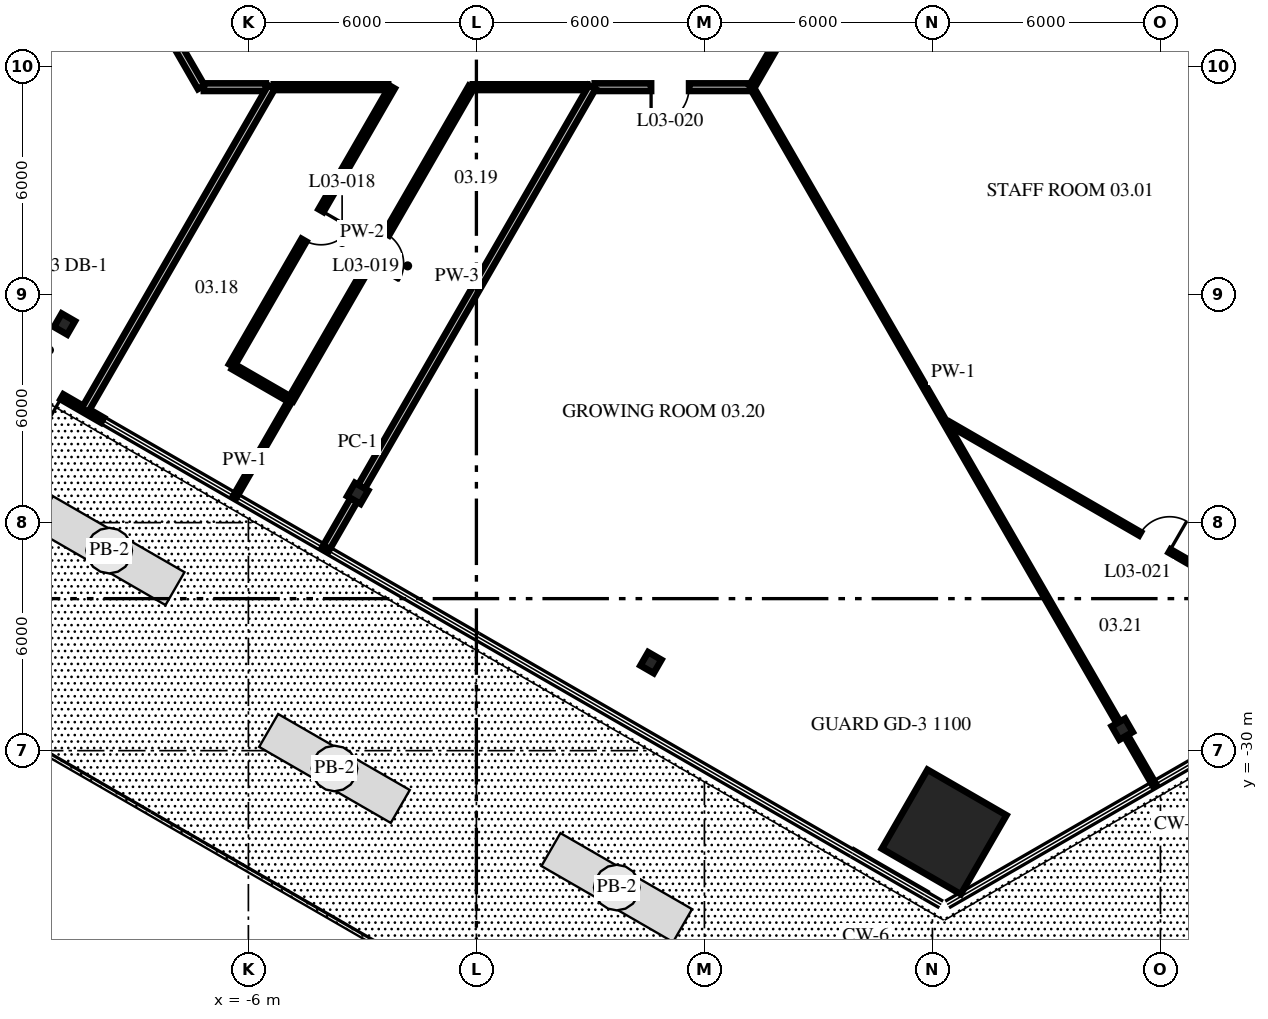
"""IFC4 building model, lengths in metres.
Left out: names, types, materials, properties, quantities, classifications, styles, units other than length and angle.
Written with IfcOpenShell. Run it as: python <this file> out.ifc"""

import sys

from ifc_helpers import new_model, si_unit, direction, frame, frame_2d, origin, origin_2d, place, context, subcontext, project, spatial, rectangle, i_section, extrude, source, transform, mapped, element, fill, save


model = new_model("IFC4")
c1 = context("Model", 3, precision=1e-05, world=origin(), true_north=direction((0.0, 1.0)))
c2 = subcontext(c1, "Body", "Model", "MODEL_VIEW")
j1 = project(units=[si_unit("LENGTHUNIT", "METRE"), si_unit("PLANEANGLEUNIT", "RADIAN")], contexts=[c1])
p1 = place(None, origin())
s1 = spatial("IfcSite", under=j1, at=p1, CompositionType="ELEMENT")
p2 = place(p1, origin())
s2 = spatial("IfcBuilding", under=s1, at=p2, CompositionType="ELEMENT")
p3 = place(p2, frame((0.0, 0.0, 16.0)))
s3 = spatial("IfcBuildingStorey", under=s2, at=p3, CompositionType="ELEMENT", Elevation=16.0)
m1 = source(origin(), c2, "Body", "SweptSolid", [
    extrude(i_section(OverallWidth=0.404, OverallDepth=0.406, WebThickness=0.027, FlangeThickness=0.044, at=origin_2d()), origin(), (0.0, 0.0, 1.0), 4.3),
])
for number, where, z_axis, x_axis in (
    (1, (-10.84, -18.775, 0.0), (0.0, 0.0, 1.0), (0.866, -0.5, 0.0)),
    (2, (-3.124, -23.23, 0.0), (0.0, 0.0, 1.0), (0.866, -0.5, 0.0)),
    (3, (4.593, -27.685, 0.0), (0.0, 0.0, 1.0), (0.866, -0.5, 0.0)),
):
    element("IfcColumn", number, at=place(p3, frame(where, z_axis=z_axis, x_axis=x_axis)), inside=s3, PredefinedType="COLUMN", context=c2, shape_type="MappedRepresentation", body=[
        mapped(m1, transform((0.0, 0.0, 0.0), scale=1.0)),
    ])
m2 = source(origin(), c2, "Body", "SweptSolid", [
    extrude(rectangle(XDim=2.4, YDim=2.4, at=origin_2d()), origin(), (0.0, 0.0, 1.0), 4.3),
])
p4 = place(p3, frame((12.309, -32.14, 0.0), z_axis=(0.0, 0.0, 1.0), x_axis=(0.866025403784, -0.5, 0.0)))
e4 = element("IfcColumn", 4, at=p4, inside=s3, PredefinedType="COLUMN", context=c2, shape_type="MappedRepresentation", body=[
    mapped(m2, transform((0.0, 0.0, 0.0), scale=1.0)),
])
p5 = place(p3, frame((16.994, -29.435, 0.0), z_axis=(0.0, 0.0, 1.0), x_axis=(0.866026276448, 0.4999984885, 0.0)))
e5 = element("IfcColumn", 5, at=p5, inside=s3, PredefinedType="COLUMN", context=c2, shape_type="MappedRepresentation", body=[
    mapped(m1, transform((0.0, 0.0, 0.0), scale=1.0)),
])
m3 = source(origin(), c2, "Body", "SweptSolid", [
    extrude(rectangle(XDim=4.263, YDim=0.15, at=frame_2d((2.131, 0.0))), origin(), (0.0, 0.0, 1.0), 4.1),
])
p6 = place(p3, frame((-9.84, -21.306, 0.0), z_axis=(0.0, 0.0, 1.0), x_axis=(-0.8660282166, 0.499995128029, 0.0)))
e6 = element("IfcWall", 6, at=p6, inside=s3, PredefinedType="ELEMENTEDWALL", context=c2, shape_type="MappedRepresentation", body=[
    mapped(m3, transform((0.0, 0.0, 0.0), scale=1.0)),
])
p7 = place(p6, frame((1.231, 0.0, 0.0)))
e7 = element("IfcOpeningElement", 7, at=p7, cuts=e6, PredefinedType="OPENING", context=c2, shape_type="SweptSolid", body=[
    extrude(rectangle(XDim=1.8, YDim=2.4, at=frame_2d((0.9, 1.2))), frame((0.0, 0.085, 0.0), z_axis=(0.0, -1.0, 0.0), x_axis=(1.0, 0.0, 0.0)), (0.0, 0.0, 1.0), 0.17),
])
p8 = place(p3, frame((-11.818, -4.615, 0.0), z_axis=(0.0, 0.0, 1.0), x_axis=(0.500011831956, -0.866018572493, 0.0)))
e8 = element("IfcWall", 8, at=p8, inside=s3, PredefinedType="PARTITIONING", context=c2, shape_type="SweptSolid", body=[
    extrude(rectangle(XDim=9.153, YDim=0.2, at=frame_2d((4.577, 0.0))), origin(), (0.0, 0.0, 1.0), 4.1),
])
p9 = place(p3, frame((7.241, -12.542, 0.0), z_axis=(0.0, 0.0, 1.0), x_axis=(0.500004409704, -0.866022857826, 0.0)))
e9 = element("IfcWall", 9, at=p9, inside=s3, PredefinedType="PARTITIONING", context=c2, shape_type="SweptSolid", body=[
    extrude(rectangle(XDim=19.313, YDim=0.1, at=frame_2d((9.656, 0.0))), origin(), (0.0, 0.0, 1.0), 4.1),
])
m4 = source(origin(), c2, "Body", "SweptSolid", [
    extrude(rectangle(XDim=1.499, YDim=0.1, at=frame_2d((0.749, 0.0))), origin(), (0.0, 0.0, 1.0), 4.1),
])
p10 = place(p3, frame((17.091, -29.602, 0.0), z_axis=(0.0, 0.0, 1.0), x_axis=(0.499976292358, -0.866039090965, 0.0)))
e10 = element("IfcWall", 10, at=p10, inside=s3, PredefinedType="PARTITIONING", context=c2, shape_type="MappedRepresentation", body=[
    mapped(m4, transform((0.0, 0.0, 0.0), scale=1.0)),
])
p11 = place(p3, frame((-6.4, -19.895, 0.0), z_axis=(0.0, 0.0, 1.0), x_axis=(0.866038843867, -0.499976720371, 0.0)))
e11 = element("IfcWall", 11, at=p11, inside=s3, PredefinedType="PARTITIONING", context=c2, shape_type="SweptSolid", body=[
    extrude(rectangle(XDim=1.69, YDim=0.15, at=frame_2d((0.845, 0.0))), origin(), (0.0, 0.0, 1.0), 4.1),
])
p12 = place(p3, frame((12.43, -21.39, 0.0), z_axis=(0.0, 0.0, 1.0), x_axis=(0.866017819526, -0.500013136091, 0.0)))
e12 = element("IfcWall", 12, at=p12, inside=s3, PredefinedType="PARTITIONING", context=c2, shape_type="SweptSolid", body=[
    extrude(rectangle(XDim=9.306, YDim=0.1, at=frame_2d((4.653, 0.0))), origin(), (0.0, 0.0, 1.0), 4.1),
])
p13 = place(p12, frame((5.81, 0.0, 0.0)))
e13 = element("IfcOpeningElement", 13, at=p13, cuts=e12, PredefinedType="OPENING", context=c2, shape_type="SweptSolid", body=[
    extrude(rectangle(XDim=0.9, YDim=2.1, at=frame_2d((0.45, 1.05))), frame((0.0, 0.06, 0.0), z_axis=(0.0, -1.0, 0.0), x_axis=(1.0, 0.0, 0.0)), (0.0, 0.0, 1.0), 0.12),
])
p14 = place(p3, frame((-7.171, -12.542, 0.0), z_axis=(0.0, 0.0, 1.0), x_axis=(1.0, 0.0, 0.0)))
e14 = element("IfcWall", 14, at=p14, inside=s3, PredefinedType="PARTITIONING", context=c2, shape_type="SweptSolid", body=[
    extrude(rectangle(XDim=1.631, YDim=0.2, at=frame_2d((0.815, 0.0))), origin(), (0.0, 0.0, 1.0), 4.1),
])
m5 = source(origin(), c2, "Body", "SweptSolid", [
    extrude(rectangle(XDim=3.008, YDim=0.15, at=frame_2d((1.504, 0.0))), origin(), (0.0, 0.0, 1.0), 4.1),
])
for number, where, z_axis, x_axis in (
    (15, (-5.33, -12.542, 0.0), (0.0, 0.0, 1.0), (1.0, 0.0, 0.0)),
    (16, (-0.094, -12.542, 0.0), (0.0, 0.0, 1.0), (1.0, 0.0, 0.0)),
):
    element("IfcWall", number, at=place(p3, frame(where, z_axis=z_axis, x_axis=x_axis)), inside=s3, PredefinedType="PARTITIONING", context=c2, shape_type="MappedRepresentation", body=[
        mapped(m5, transform((0.0, 0.0, 0.0), scale=1.0)),
    ])
p15 = place(p3, frame((3.114, -12.542, 0.0), z_axis=(0.0, 0.0, 1.0), x_axis=(1.0, 0.0, 0.0)))
e17 = element("IfcWall", 17, at=p15, inside=s3, PredefinedType="PARTITIONING", context=c2, shape_type="SweptSolid", body=[
    extrude(rectangle(XDim=4.088, YDim=0.2, at=frame_2d((2.044, 0.0))), origin(), (0.0, 0.0, 1.0), 4.1),
])
p16 = place(p15, frame((1.483, 0.0, 0.0)))
e18 = element("IfcOpeningElement", 18, at=p16, cuts=e17, PredefinedType="OPENING", context=c2, shape_type="SweptSolid", body=[
    extrude(rectangle(XDim=1.0, YDim=2.1, at=frame_2d((0.5, 1.05))), frame((0.0, 0.11, 0.0), z_axis=(0.0, -1.0, 0.0), x_axis=(1.0, 0.0, 0.0)), (0.0, 0.0, 1.0), 0.22),
])
p17 = place(p3, frame((7.251, -12.525, 0.0), z_axis=(0.0, 0.0, 1.0), x_axis=(0.499988071196, 0.866032290773, 0.0)))
e19 = element("IfcWall", 19, at=p17, inside=s3, PredefinedType="PARTITIONING", context=c2, shape_type="SweptSolid", body=[
    extrude(rectangle(XDim=9.203, YDim=0.15, at=frame_2d((4.602, 0.0))), origin(), (0.0, 0.0, 1.0), 4.1),
])
p18 = place(p17, frame((1.63, 0.0, 0.0)))
e20 = element("IfcOpeningElement", 20, at=p18, cuts=e19, PredefinedType="OPENING", context=c2, shape_type="SweptSolid", body=[
    extrude(rectangle(XDim=0.9, YDim=2.1, at=frame_2d((0.45, 1.05))), frame((0.0, 0.085, 0.0), z_axis=(0.0, -1.0, 0.0), x_axis=(1.0, 0.0, 0.0)), (0.0, 0.0, 1.0), 0.17),
])
m6 = source(origin(), c2, "Body", "SweptSolid", [
    extrude(rectangle(XDim=1.499, YDim=0.2, at=frame_2d((0.75, 0.0))), origin(), (0.0, 0.0, 1.0), 4.1),
])
p19 = place(p3, frame((-3.969, -24.695, 0.0), z_axis=(0.0, 0.0, 1.0), x_axis=(0.499905760005, 0.866079806435, 0.0)))
e21 = element("IfcWall", 21, at=p19, inside=s3, PredefinedType="PARTITIONING", context=c2, shape_type="MappedRepresentation", body=[
    mapped(m6, transform((0.0, 0.0, 0.0), scale=1.0)),
])
m7 = source(origin(), c2, "Body", "SweptSolid", [
    extrude(rectangle(XDim=12.148, YDim=0.2, at=frame_2d((6.074, 0.0))), origin(), (0.0, 0.0, 1.0), 3.343),
])
p20 = place(p3, frame((-3.027, -23.063, 0.0), z_axis=(0.0, 0.0, 1.0), x_axis=(0.499997320042, 0.866026951053, 0.0)))
e22 = element("IfcWall", 22, at=p20, inside=s3, PredefinedType="PARTITIONING", context=c2, shape_type="MappedRepresentation", body=[
    mapped(m7, transform((0.0, 0.0, 0.0), scale=1.0)),
])
m8 = source(origin(), c2, "Body", "SweptSolid", [
    extrude(rectangle(XDim=2.942, YDim=0.1, at=frame_2d((1.471, 0.0))), origin(), (0.0, 0.0, 1.0), 4.1),
])
p21 = place(p3, frame((-6.355, -23.318, 0.0), z_axis=(0.0, 0.0, 1.0), x_axis=(0.49992360228, 0.866069507536, 0.0)))
e23 = element("IfcWall", 23, at=p21, inside=s3, PredefinedType="PARTITIONING", context=c2, shape_type="MappedRepresentation", body=[
    mapped(m8, transform((0.0, 0.0, 0.0), scale=1.0)),
])
p22 = place(p3, frame((-4.885, -20.77, 0.0), z_axis=(0.0, 0.0, 1.0), x_axis=(0.499994576128, 0.866028535236, 0.0)))
e24 = element("IfcWall", 24, at=p22, inside=s3, PredefinedType="PARTITIONING", context=c2, shape_type="SweptSolid", body=[
    extrude(rectangle(XDim=9.5, YDim=0.15, at=frame_2d((4.75, 0.0))), origin(), (0.0, 0.0, 1.0), 4.1),
])
p23 = place(p22, frame((4.14, 0.0, 0.0)))
e25 = element("IfcOpeningElement", 25, at=p23, cuts=e24, PredefinedType="OPENING", context=c2, shape_type="SweptSolid", body=[
    extrude(rectangle(XDim=0.9, YDim=2.1, at=frame_2d((0.45, 1.05))), frame((0.0, 0.085, 0.0), z_axis=(0.0, -1.0, 0.0), x_axis=(1.0, 0.0, 0.0)), (0.0, 0.0, 1.0), 0.17),
])
p24 = place(p3, frame((-6.444, -19.87, 0.0), z_axis=(0.0, 0.0, 1.0), x_axis=(0.500008851346, 0.866020293397, 0.0)))
e26 = element("IfcWall", 26, at=p24, inside=s3, PredefinedType="PARTITIONING", context=c2, shape_type="SweptSolid", body=[
    extrude(rectangle(XDim=8.461, YDim=0.15, at=frame_2d((4.23, 0.0))), origin(), (0.0, 0.0, 1.0), 3.417),
])
p25 = place(p24, frame((3.811, 0.0, 0.0)))
e27 = element("IfcOpeningElement", 27, at=p25, cuts=e26, PredefinedType="OPENING", context=c2, shape_type="SweptSolid", body=[
    extrude(rectangle(XDim=0.9, YDim=2.1, at=frame_2d((0.45, 1.05))), frame((0.0, 0.085, 0.0), z_axis=(0.0, -1.0, 0.0), x_axis=(1.0, 0.0, 0.0)), (0.0, 0.0, 1.0), 0.17),
])
m9 = source(origin(), c2, "Body", "SweptSolid", [
    extrude(rectangle(XDim=9.813, YDim=0.2, at=frame_2d((4.906, 0.0))), origin(), (0.0, 0.0, 1.0), 4.1),
])
p26 = place(p3, frame((-10.3, -21.04, 0.0), z_axis=(0.0, 0.0, 1.0), x_axis=(0.49999238347, 0.866029801145, 0.0)))
e28 = element("IfcWall", 28, at=p26, inside=s3, PredefinedType="PARTITIONING", context=c2, shape_type="MappedRepresentation", body=[
    mapped(m9, transform((0.0, 0.0, 0.0), scale=1.0)),
])
p27 = place(p7, origin())
e29 = element("IfcDoor", 29, at=p27, inside=s3, OperationType="DOUBLE_DOOR_SINGLE_SWING", PredefinedType="DOOR", context=c2, shape_type="SweptSolid", body=[
    extrude(rectangle(XDim=1.8, YDim=2.4, at=frame_2d((0.9, 1.2))), frame((0.0, 0.025, 0.0), z_axis=(0.0, -1.0, 0.0), x_axis=(1.0, 0.0, 0.0)), (0.0, 0.0, 1.0), 0.05),
])
fill(e7, e29)
p28 = place(p25, origin())
e30 = element("IfcDoor", 30, at=p28, inside=s3, OperationType="SINGLE_SWING_RIGHT", PredefinedType="DOOR", context=c2, shape_type="SweptSolid", body=[
    extrude(rectangle(XDim=0.9, YDim=2.1, at=frame_2d((0.45, 1.05))), frame((0.0, 0.025, 0.0), z_axis=(0.0, -1.0, 0.0), x_axis=(1.0, 0.0, 0.0)), (0.0, 0.0, 1.0), 0.05),
])
fill(e27, e30)
p29 = place(p23, origin())
e31 = element("IfcDoor", 31, at=p29, inside=s3, OperationType="SINGLE_SWING_RIGHT", PredefinedType="DOOR", context=c2, shape_type="SweptSolid", body=[
    extrude(rectangle(XDim=0.9, YDim=2.1, at=frame_2d((0.45, 1.05))), frame((0.0, 0.025, 0.0), z_axis=(0.0, -1.0, 0.0), x_axis=(1.0, 0.0, 0.0)), (0.0, 0.0, 1.0), 0.05),
])
fill(e25, e31)
p30 = place(p16, origin())
e32 = element("IfcDoor", 32, at=p30, inside=s3, OperationType="SINGLE_SWING_RIGHT", PredefinedType="DOOR", context=c2, shape_type="SweptSolid", body=[
    extrude(rectangle(XDim=1.0, YDim=2.1, at=frame_2d((0.5, 1.05))), frame((0.0, 0.025, 0.0), z_axis=(0.0, -1.0, 0.0), x_axis=(1.0, 0.0, 0.0)), (0.0, 0.0, 1.0), 0.05),
])
fill(e18, e32)
p31 = place(p13, origin())
e33 = element("IfcDoor", 33, at=p31, inside=s3, OperationType="SINGLE_SWING_LEFT", PredefinedType="DOOR", context=c2, shape_type="SweptSolid", body=[
    extrude(rectangle(XDim=0.9, YDim=2.1, at=frame_2d((0.45, 1.05))), frame((0.0, 0.025, 0.0), z_axis=(0.0, -1.0, 0.0), x_axis=(1.0, 0.0, 0.0)), (0.0, 0.0, 1.0), 0.05),
])
fill(e13, e33)
save(model, sys.argv[1])
